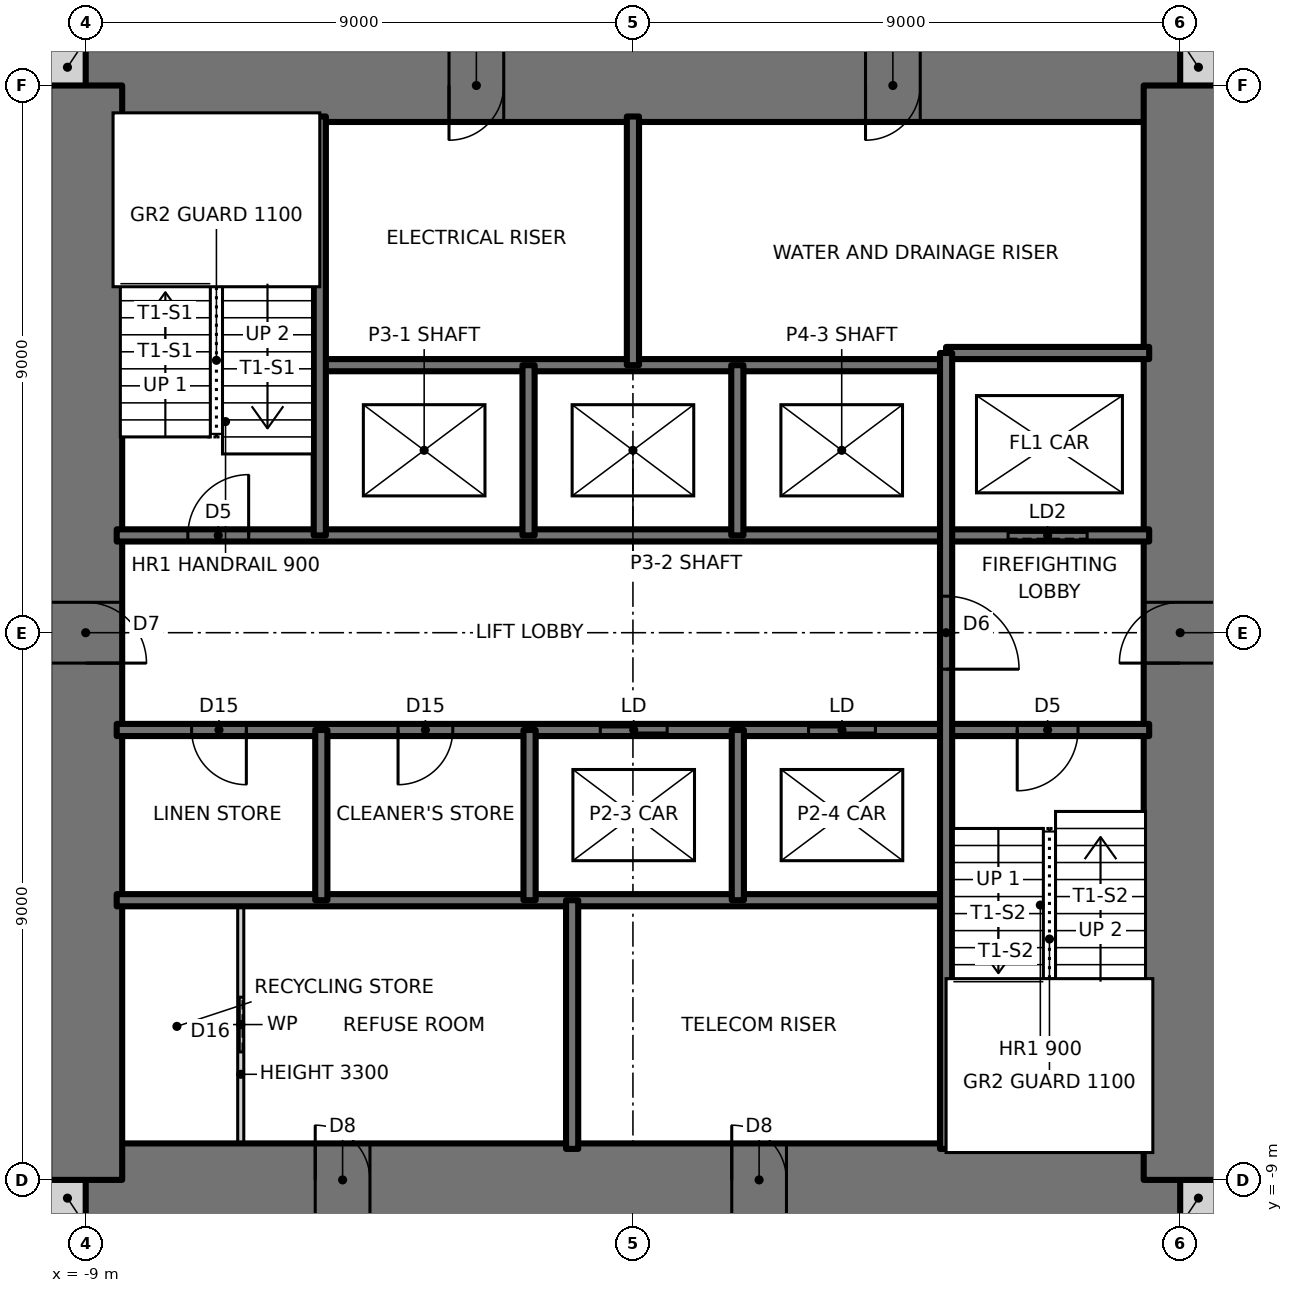
"""IFC4 building model, lengths in metres.
Left out: names, types, materials, properties, quantities, classifications, styles, units other than length and angle.
Written with IfcOpenShell. Run it as: python <this file> out.ifc"""

import sys

from ifc_helpers import new_model, si_unit, direction, frame, frame_2d, origin, place, context, subcontext, project, spatial, rectangle, extrude, element, fill, save


model = new_model("IFC4")
c1 = context("Model", 3, precision=1e-05, world=origin(), true_north=direction((0.0, 1.0)))
c2 = subcontext(c1, "Body", "Model", "MODEL_VIEW")
j1 = project(units=[si_unit("LENGTHUNIT", "METRE"), si_unit("PLANEANGLEUNIT", "RADIAN")], contexts=[c1])
p1 = place(None, origin())
s1 = spatial("IfcSite", under=j1, at=p1, CompositionType="ELEMENT")
p2 = place(p1, origin())
s2 = spatial("IfcBuilding", under=s1, at=p2, CompositionType="ELEMENT")
p3 = place(p2, frame((0.0, 0.0, 112.0)))
s3 = spatial("IfcBuildingStorey", under=s2, at=p3, CompositionType="ELEMENT", Elevation=112.0)
for number, where, z_axis, x_axis in (
    (1, (-9.6, -9.3, 0.0), (0.0, 0.0, 1.0), (1.0, 0.0, 0.0)),
    (2, (9.0, -9.3, 0.0), (0.0, 0.0, 1.0), (1.0, 0.0, 0.0)),
    (3, (9.0, 9.3, 0.0), (0.0, 0.0, 1.0), (1.0, 0.0, 0.0)),
    (4, (-9.6, 9.3, 0.0), (0.0, 0.0, 1.0), (1.0, 0.0, 0.0)),
):
    element("IfcWall", number, at=place(p3, frame(where, z_axis=z_axis, x_axis=x_axis)), inside=s3, PredefinedType="SOLIDWALL", context=c2, shape_type="SweptSolid", body=[
        extrude(rectangle(XDim=0.6, YDim=0.6, at=frame_2d((0.3, 0.0))), origin(), (0.0, 0.0, 1.0), 3.5),
    ])
p4 = place(p3, frame((-9.0, -9.0, 0.0), z_axis=(0.0, 0.0, 1.0), x_axis=(1.0, 0.0, 0.0)))
e5 = element("IfcWall", 5, at=p4, inside=s3, PredefinedType="SHEAR", context=c2, shape_type="SweptSolid", body=[
    extrude(rectangle(XDim=18.0, YDim=1.2, at=frame_2d((9.0, 0.0))), origin(), (0.0, 0.0, 1.0), 3.5),
])
p5 = place(p4, frame((3.775, 0.0, 0.0)))
e6 = element("IfcOpeningElement", 6, at=p5, cuts=e5, PredefinedType="OPENING", context=c2, shape_type="SweptSolid", body=[
    extrude(rectangle(XDim=0.9, YDim=2.1, at=frame_2d((0.45, 1.05))), frame((0.0, 0.61, 0.0), z_axis=(0.0, -1.0, 0.0), x_axis=(1.0, 0.0, 0.0)), (0.0, 0.0, 1.0), 1.22),
])
p6 = place(p4, frame((10.625, 0.0, 0.0)))
e7 = element("IfcOpeningElement", 7, at=p6, cuts=e5, PredefinedType="OPENING", context=c2, shape_type="SweptSolid", body=[
    extrude(rectangle(XDim=0.9, YDim=2.1, at=frame_2d((0.45, 1.05))), frame((0.0, 0.61, 0.0), z_axis=(0.0, -1.0, 0.0), x_axis=(1.0, 0.0, 0.0)), (0.0, 0.0, 1.0), 1.22),
])
p7 = place(p3, frame((9.0, 9.0, 0.0), z_axis=(0.0, 0.0, 1.0), x_axis=(-1.0, 0.0, 0.0)))
e8 = element("IfcWall", 8, at=p7, inside=s3, PredefinedType="SHEAR", context=c2, shape_type="SweptSolid", body=[
    extrude(rectangle(XDim=18.0, YDim=1.2, at=frame_2d((9.0, 0.0))), origin(), (0.0, 0.0, 1.0), 3.5),
])
p8 = place(p7, frame((11.125, 0.0, 0.0)))
e9 = element("IfcOpeningElement", 9, at=p8, cuts=e8, PredefinedType="OPENING", context=c2, shape_type="SweptSolid", body=[
    extrude(rectangle(XDim=0.9, YDim=2.1, at=frame_2d((0.45, 1.05))), frame((0.0, 0.61, 0.0), z_axis=(0.0, -1.0, 0.0), x_axis=(1.0, 0.0, 0.0)), (0.0, 0.0, 1.0), 1.22),
])
p9 = place(p7, frame((4.275, 0.0, 0.0)))
e10 = element("IfcOpeningElement", 10, at=p9, cuts=e8, PredefinedType="OPENING", context=c2, shape_type="SweptSolid", body=[
    extrude(rectangle(XDim=0.9, YDim=2.1, at=frame_2d((0.45, 1.05))), frame((0.0, 0.61, 0.0), z_axis=(0.0, -1.0, 0.0), x_axis=(1.0, 0.0, 0.0)), (0.0, 0.0, 1.0), 1.22),
])
p10 = place(p3, frame((9.0, -9.0, 0.0), z_axis=(0.0, 0.0, 1.0), x_axis=(0.0, 1.0, 0.0)))
e11 = element("IfcWall", 11, at=p10, inside=s3, PredefinedType="SHEAR", context=c2, shape_type="SweptSolid", body=[
    extrude(rectangle(XDim=18.0, YDim=1.2, at=frame_2d((9.0, 0.0))), origin(), (0.0, 0.0, 1.0), 3.5),
])
p11 = place(p10, frame((8.5, 0.0, 0.0)))
e12 = element("IfcOpeningElement", 12, at=p11, cuts=e11, PredefinedType="OPENING", context=c2, shape_type="SweptSolid", body=[
    extrude(rectangle(XDim=1.0, YDim=2.1, at=frame_2d((0.5, 1.05))), frame((0.0, 0.61, 0.0), z_axis=(0.0, -1.0, 0.0), x_axis=(1.0, 0.0, 0.0)), (0.0, 0.0, 1.0), 1.22),
])
p12 = place(p3, frame((-9.0, 9.0, 0.0), z_axis=(0.0, 0.0, 1.0), x_axis=(0.0, -1.0, 0.0)))
e13 = element("IfcWall", 13, at=p12, inside=s3, PredefinedType="SHEAR", context=c2, shape_type="SweptSolid", body=[
    extrude(rectangle(XDim=18.0, YDim=1.2, at=frame_2d((9.0, 0.0))), origin(), (0.0, 0.0, 1.0), 3.5),
])
p13 = place(p12, frame((8.5, 0.0, 0.0)))
e14 = element("IfcOpeningElement", 14, at=p13, cuts=e13, PredefinedType="OPENING", context=c2, shape_type="SweptSolid", body=[
    extrude(rectangle(XDim=1.0, YDim=2.1, at=frame_2d((0.5, 1.05))), frame((0.0, 0.61, 0.0), z_axis=(0.0, -1.0, 0.0), x_axis=(1.0, 0.0, 0.0)), (0.0, 0.0, 1.0), 1.22),
])
p14 = place(p3, frame((-8.49, -4.4, 0.0), z_axis=(0.0, 0.0, 1.0), x_axis=(1.0, 0.0, 0.0)))
e15 = element("IfcWall", 15, at=p14, inside=s3, PredefinedType="SOLIDWALL", context=c2, shape_type="SweptSolid", body=[
    extrude(rectangle(XDim=13.64, YDim=0.2, at=frame_2d((6.82, 0.0))), origin(), (0.0, 0.0, 1.0), 3.5),
])
p15 = place(p3, frame((-8.49, -1.6, 0.0), z_axis=(0.0, 0.0, 1.0), x_axis=(1.0, 0.0, 0.0)))
e16 = element("IfcWall", 16, at=p15, inside=s3, PredefinedType="SOLIDWALL", context=c2, shape_type="SweptSolid", body=[
    extrude(rectangle(XDim=16.98, YDim=0.2, at=frame_2d((8.49, 0.0))), origin(), (0.0, 0.0, 1.0), 3.5),
])
p16 = place(p15, frame((14.81, 0.0, 0.0)))
e17 = element("IfcOpeningElement", 17, at=p16, cuts=e16, PredefinedType="OPENING", context=c2, shape_type="SweptSolid", body=[
    extrude(rectangle(XDim=1.0, YDim=2.1, at=frame_2d((0.5, 1.05))), frame((0.0, 0.11, 0.0), z_axis=(0.0, -1.0, 0.0), x_axis=(1.0, 0.0, 0.0)), (0.0, 0.0, 1.0), 0.22),
])
p17 = place(p15, frame((1.232, 0.0, 0.0)))
e18 = element("IfcOpeningElement", 18, at=p17, cuts=e16, PredefinedType="OPENING", context=c2, shape_type="SweptSolid", body=[
    extrude(rectangle(XDim=0.9, YDim=2.1, at=frame_2d((0.45, 1.05))), frame((0.0, 0.11, 0.0), z_axis=(0.0, -1.0, 0.0), x_axis=(1.0, 0.0, 0.0)), (0.0, 0.0, 1.0), 0.22),
])
p18 = place(p15, frame((4.627, 0.0, 0.0)))
e19 = element("IfcOpeningElement", 19, at=p18, cuts=e16, PredefinedType="OPENING", context=c2, shape_type="SweptSolid", body=[
    extrude(rectangle(XDim=0.9, YDim=2.1, at=frame_2d((0.45, 1.05))), frame((0.0, 0.11, 0.0), z_axis=(0.0, -1.0, 0.0), x_axis=(1.0, 0.0, 0.0)), (0.0, 0.0, 1.0), 0.22),
])
p19 = place(p15, frame((7.953, 0.0, 0.0)))
e20 = element("IfcOpeningElement", 20, at=p19, cuts=e16, PredefinedType="OPENING", context=c2, shape_type="SweptSolid", body=[
    extrude(rectangle(XDim=1.1, YDim=2.1, at=frame_2d((0.55, 1.05))), frame((0.0, 0.11, 0.0), z_axis=(0.0, -1.0, 0.0), x_axis=(1.0, 0.0, 0.0)), (0.0, 0.0, 1.0), 0.22),
])
p20 = place(p15, frame((11.378, 0.0, 0.0)))
e21 = element("IfcOpeningElement", 21, at=p20, cuts=e16, PredefinedType="OPENING", context=c2, shape_type="SweptSolid", body=[
    extrude(rectangle(XDim=1.1, YDim=2.1, at=frame_2d((0.55, 1.05))), frame((0.0, 0.11, 0.0), z_axis=(0.0, -1.0, 0.0), x_axis=(1.0, 0.0, 0.0)), (0.0, 0.0, 1.0), 0.22),
])
p21 = place(p3, frame((-8.49, 1.6, 0.0), z_axis=(0.0, 0.0, 1.0), x_axis=(1.0, 0.0, 0.0)))
e22 = element("IfcWall", 22, at=p21, inside=s3, PredefinedType="SOLIDWALL", context=c2, shape_type="SweptSolid", body=[
    extrude(rectangle(XDim=16.98, YDim=0.2, at=frame_2d((8.49, 0.0))), origin(), (0.0, 0.0, 1.0), 3.5),
])
p22 = place(p21, frame((1.17, 0.0, 0.0)))
e23 = element("IfcOpeningElement", 23, at=p22, cuts=e22, PredefinedType="OPENING", context=c2, shape_type="SweptSolid", body=[
    extrude(rectangle(XDim=1.0, YDim=2.1, at=frame_2d((0.5, 1.05))), frame((0.0, 0.11, 0.0), z_axis=(0.0, -1.0, 0.0), x_axis=(1.0, 0.0, 0.0)), (0.0, 0.0, 1.0), 0.22),
])
p23 = place(p21, frame((14.66, 0.0, 0.0)))
e24 = element("IfcOpeningElement", 24, at=p23, cuts=e22, PredefinedType="OPENING", context=c2, shape_type="SweptSolid", body=[
    extrude(rectangle(XDim=1.3, YDim=2.1, at=frame_2d((0.65, 1.05))), frame((0.0, 0.11, 0.0), z_axis=(0.0, -1.0, 0.0), x_axis=(1.0, 0.0, 0.0)), (0.0, 0.0, 1.0), 0.22),
])
p24 = place(p3, frame((-5.15, 4.4, 0.0), z_axis=(0.0, 0.0, 1.0), x_axis=(1.0, 0.0, 0.0)))
e25 = element("IfcWall", 25, at=p24, inside=s3, PredefinedType="SOLIDWALL", context=c2, shape_type="SweptSolid", body=[
    extrude(rectangle(XDim=10.3, YDim=0.2, at=frame_2d((5.15, 0.0))), origin(), (0.0, 0.0, 1.0), 3.5),
])
p25 = place(p3, frame((5.15, 4.6, 0.0), z_axis=(0.0, 0.0, 1.0), x_axis=(1.0, 0.0, 0.0)))
e26 = element("IfcWall", 26, at=p25, inside=s3, PredefinedType="SOLIDWALL", context=c2, shape_type="SweptSolid", body=[
    extrude(rectangle(XDim=3.34, YDim=0.2, at=frame_2d((1.67, 0.0))), origin(), (0.0, 0.0, 1.0), 3.5),
])
p26 = place(p3, frame((5.15, -8.49, 0.0), z_axis=(0.0, 0.0, 1.0), x_axis=(0.0, 1.0, 0.0)))
e27 = element("IfcWall", 27, at=p26, inside=s3, PredefinedType="SOLIDWALL", context=c2, shape_type="SweptSolid", body=[
    extrude(rectangle(XDim=13.09, YDim=0.2, at=frame_2d((6.545, 0.0))), origin(), (0.0, 0.0, 1.0), 3.5),
])
p27 = place(p26, frame((7.89, 0.0, 0.0)))
e28 = element("IfcOpeningElement", 28, at=p27, cuts=e27, PredefinedType="OPENING", context=c2, shape_type="SweptSolid", body=[
    extrude(rectangle(XDim=1.2, YDim=2.1, at=frame_2d((0.6, 1.05))), frame((0.0, 0.11, 0.0), z_axis=(0.0, -1.0, 0.0), x_axis=(1.0, 0.0, 0.0)), (0.0, 0.0, 1.0), 0.22),
])
for number, where, z_axis, x_axis in (
    (29, (1.725, -4.4, 0.0), (0.0, 0.0, 1.0), (0.0, 1.0, 0.0)),
    (30, (1.717, 1.6, 0.0), (0.0, 0.0, 1.0), (0.0, 1.0, 0.0)),
):
    element("IfcWall", number, at=place(p3, frame(where, z_axis=z_axis, x_axis=x_axis)), inside=s3, PredefinedType="SOLIDWALL", context=c2, shape_type="SweptSolid", body=[
        extrude(rectangle(XDim=2.8, YDim=0.2, at=frame_2d((1.4, 0.0))), origin(), (0.0, 0.0, 1.0), 3.5),
    ])
for number, where, z_axis, x_axis in (
    (31, (0.0, 4.4, 0.0), (0.0, 0.0, 1.0), (0.0, 1.0, 0.0)),
    (32, (-1.0, -8.49, 0.0), (0.0, 0.0, 1.0), (0.0, 1.0, 0.0)),
):
    element("IfcWall", number, at=place(p3, frame(where, z_axis=z_axis, x_axis=x_axis)), inside=s3, PredefinedType="SOLIDWALL", context=c2, shape_type="SweptSolid", body=[
        extrude(rectangle(XDim=4.09, YDim=0.2, at=frame_2d((2.045, 0.0))), origin(), (0.0, 0.0, 1.0), 3.5),
    ])
for number, where, z_axis, x_axis in (
    (33, (-1.7, -4.4, 0.0), (0.0, 0.0, 1.0), (0.0, 1.0, 0.0)),
    (34, (-1.717, 1.6, 0.0), (0.0, 0.0, 1.0), (0.0, 1.0, 0.0)),
    (35, (-5.125, -4.4, 0.0), (0.0, 0.0, 1.0), (0.0, 1.0, 0.0)),
):
    element("IfcWall", number, at=place(p3, frame(where, z_axis=z_axis, x_axis=x_axis)), inside=s3, PredefinedType="SOLIDWALL", context=c2, shape_type="SweptSolid", body=[
        extrude(rectangle(XDim=2.8, YDim=0.2, at=frame_2d((1.4, 0.0))), origin(), (0.0, 0.0, 1.0), 3.5),
    ])
p28 = place(p3, frame((-5.15, 1.6, 0.0), z_axis=(0.0, 0.0, 1.0), x_axis=(0.0, 1.0, 0.0)))
e36 = element("IfcWall", 36, at=p28, inside=s3, PredefinedType="SOLIDWALL", context=c2, shape_type="SweptSolid", body=[
    extrude(rectangle(XDim=6.89, YDim=0.2, at=frame_2d((3.445, 0.0))), origin(), (0.0, 0.0, 1.0), 3.5),
])
p29 = place(p3, frame((-6.45, -8.49, 0.0), z_axis=(0.0, 0.0, 1.0), x_axis=(0.0, 1.0, 0.0)))
e37 = element("IfcWall", 37, at=p29, inside=s3, PredefinedType="PARTITIONING", context=c2, shape_type="SweptSolid", body=[
    extrude(rectangle(XDim=4.09, YDim=0.1, at=frame_2d((2.045, 0.0))), origin(), (0.0, 0.0, 1.0), 3.3),
])
p30 = place(p29, frame((1.595, 0.0, 0.0)))
e38 = element("IfcOpeningElement", 38, at=p30, cuts=e37, PredefinedType="OPENING", context=c2, shape_type="SweptSolid", body=[
    extrude(rectangle(XDim=0.9, YDim=2.1, at=frame_2d((0.45, 1.05))), frame((0.0, 0.06, 0.0), z_axis=(0.0, -1.0, 0.0), x_axis=(1.0, 0.0, 0.0)), (0.0, 0.0, 1.0), 0.12),
])
p31 = place(p22, origin())
e39 = element("IfcDoor", 39, at=p31, inside=s3, OperationType="SINGLE_SWING_RIGHT", PredefinedType="DOOR", context=c2, shape_type="SweptSolid", body=[
    extrude(rectangle(XDim=1.0, YDim=2.1, at=frame_2d((0.5, 1.05))), frame((0.0, 0.025, 0.0), z_axis=(0.0, -1.0, 0.0), x_axis=(1.0, 0.0, 0.0)), (0.0, 0.0, 1.0), 0.05),
])
fill(e23, e39)
p32 = place(p16, frame((1.0, 0.0, 0.0), z_axis=(0.0, 0.0, 1.0), x_axis=(-1.0, 0.0, 0.0)))
e40 = element("IfcDoor", 40, at=p32, inside=s3, OperationType="SINGLE_SWING_RIGHT", PredefinedType="DOOR", context=c2, shape_type="SweptSolid", body=[
    extrude(rectangle(XDim=1.0, YDim=2.1, at=frame_2d((0.5, 1.05))), frame((0.0, 0.025, 0.0), z_axis=(0.0, -1.0, 0.0), x_axis=(1.0, 0.0, 0.0)), (0.0, 0.0, 1.0), 0.05),
])
fill(e17, e40)
p33 = place(p27, frame((1.2, 0.0, 0.0), z_axis=(0.0, 0.0, 1.0), x_axis=(-1.0, 0.0, 0.0)))
e41 = element("IfcDoor", 41, at=p33, inside=s3, OperationType="SINGLE_SWING_RIGHT", PredefinedType="DOOR", context=c2, shape_type="SweptSolid", body=[
    extrude(rectangle(XDim=1.2, YDim=2.1, at=frame_2d((0.6, 1.05))), frame((0.0, 0.025, 0.0), z_axis=(0.0, -1.0, 0.0), x_axis=(1.0, 0.0, 0.0)), (0.0, 0.0, 1.0), 0.05),
])
fill(e28, e41)
p34 = place(p17, frame((0.9, 0.0, 0.0), z_axis=(0.0, 0.0, 1.0), x_axis=(-1.0, 0.0, 0.0)))
e42 = element("IfcDoor", 42, at=p34, inside=s3, OperationType="SINGLE_SWING_LEFT", PredefinedType="DOOR", context=c2, shape_type="SweptSolid", body=[
    extrude(rectangle(XDim=0.9, YDim=2.1, at=frame_2d((0.45, 1.05))), frame((0.0, 0.025, 0.0), z_axis=(0.0, -1.0, 0.0), x_axis=(1.0, 0.0, 0.0)), (0.0, 0.0, 1.0), 0.05),
])
fill(e18, e42)
p35 = place(p18, frame((0.9, 0.0, 0.0), z_axis=(0.0, 0.0, 1.0), x_axis=(-1.0, 0.0, 0.0)))
e43 = element("IfcDoor", 43, at=p35, inside=s3, OperationType="SINGLE_SWING_RIGHT", PredefinedType="DOOR", context=c2, shape_type="SweptSolid", body=[
    extrude(rectangle(XDim=0.9, YDim=2.1, at=frame_2d((0.45, 1.05))), frame((0.0, 0.025, 0.0), z_axis=(0.0, -1.0, 0.0), x_axis=(1.0, 0.0, 0.0)), (0.0, 0.0, 1.0), 0.05),
])
fill(e19, e43)
p36 = place(p30, origin())
e44 = element("IfcDoor", 44, at=p36, inside=s3, OperationType="SLIDING_TO_LEFT", PredefinedType="DOOR", context=c2, shape_type="SweptSolid", body=[
    extrude(rectangle(XDim=0.9, YDim=2.1, at=frame_2d((0.45, 1.05))), frame((0.0, 0.025, 0.0), z_axis=(0.0, -1.0, 0.0), x_axis=(1.0, 0.0, 0.0)), (0.0, 0.0, 1.0), 0.05),
])
fill(e38, e44)
p37 = place(p13, origin())
e45 = element("IfcDoor", 45, at=p37, inside=s3, OperationType="SINGLE_SWING_RIGHT", PredefinedType="DOOR", context=c2, shape_type="SweptSolid", body=[
    extrude(rectangle(XDim=1.0, YDim=2.1, at=frame_2d((0.5, 1.05))), frame((0.0, 0.025, 0.0), z_axis=(0.0, -1.0, 0.0), x_axis=(1.0, 0.0, 0.0)), (0.0, 0.0, 1.0), 0.05),
])
fill(e14, e45)
p38 = place(p11, origin())
e46 = element("IfcDoor", 46, at=p38, inside=s3, OperationType="SINGLE_SWING_LEFT", PredefinedType="DOOR", context=c2, shape_type="SweptSolid", body=[
    extrude(rectangle(XDim=1.0, YDim=2.1, at=frame_2d((0.5, 1.05))), frame((0.0, 0.025, 0.0), z_axis=(0.0, -1.0, 0.0), x_axis=(1.0, 0.0, 0.0)), (0.0, 0.0, 1.0), 0.05),
])
fill(e12, e46)
p39 = place(p8, origin())
e47 = element("IfcDoor", 47, at=p39, inside=s3, OperationType="SINGLE_SWING_RIGHT", PredefinedType="DOOR", context=c2, shape_type="SweptSolid", body=[
    extrude(rectangle(XDim=0.9, YDim=2.1, at=frame_2d((0.45, 1.05))), frame((0.0, 0.025, 0.0), z_axis=(0.0, -1.0, 0.0), x_axis=(1.0, 0.0, 0.0)), (0.0, 0.0, 1.0), 0.05),
])
fill(e9, e47)
p40 = place(p9, origin())
e48 = element("IfcDoor", 48, at=p40, inside=s3, OperationType="SINGLE_SWING_RIGHT", PredefinedType="DOOR", context=c2, shape_type="SweptSolid", body=[
    extrude(rectangle(XDim=0.9, YDim=2.1, at=frame_2d((0.45, 1.05))), frame((0.0, 0.025, 0.0), z_axis=(0.0, -1.0, 0.0), x_axis=(1.0, 0.0, 0.0)), (0.0, 0.0, 1.0), 0.05),
])
fill(e10, e48)
p41 = place(p5, origin())
e49 = element("IfcDoor", 49, at=p41, inside=s3, OperationType="SINGLE_SWING_LEFT", PredefinedType="DOOR", context=c2, shape_type="SweptSolid", body=[
    extrude(rectangle(XDim=0.9, YDim=2.1, at=frame_2d((0.45, 1.05))), frame((0.0, 0.025, 0.0), z_axis=(0.0, -1.0, 0.0), x_axis=(1.0, 0.0, 0.0)), (0.0, 0.0, 1.0), 0.05),
])
fill(e6, e49)
p42 = place(p6, origin())
e50 = element("IfcDoor", 50, at=p42, inside=s3, OperationType="SINGLE_SWING_LEFT", PredefinedType="DOOR", context=c2, shape_type="SweptSolid", body=[
    extrude(rectangle(XDim=0.9, YDim=2.1, at=frame_2d((0.45, 1.05))), frame((0.0, 0.025, 0.0), z_axis=(0.0, -1.0, 0.0), x_axis=(1.0, 0.0, 0.0)), (0.0, 0.0, 1.0), 0.05),
])
fill(e7, e50)
p43 = place(p19, origin())
e51 = element("IfcDoor", 51, at=p43, inside=s3, OperationType="DOUBLE_DOOR_SLIDING", PredefinedType="DOOR", context=c2, shape_type="SweptSolid", body=[
    extrude(rectangle(XDim=1.1, YDim=2.1, at=frame_2d((0.55, 1.05))), frame((0.0, 0.025, 0.0), z_axis=(0.0, -1.0, 0.0), x_axis=(1.0, 0.0, 0.0)), (0.0, 0.0, 1.0), 0.05),
])
fill(e20, e51)
p44 = place(p20, origin())
e52 = element("IfcDoor", 52, at=p44, inside=s3, OperationType="DOUBLE_DOOR_SLIDING", PredefinedType="DOOR", context=c2, shape_type="SweptSolid", body=[
    extrude(rectangle(XDim=1.1, YDim=2.1, at=frame_2d((0.55, 1.05))), frame((0.0, 0.025, 0.0), z_axis=(0.0, -1.0, 0.0), x_axis=(1.0, 0.0, 0.0)), (0.0, 0.0, 1.0), 0.05),
])
fill(e21, e52)
p45 = place(p23, origin())
e53 = element("IfcDoor", 53, at=p45, inside=s3, OperationType="SLIDING_TO_LEFT", PredefinedType="DOOR", context=c2, shape_type="SweptSolid", body=[
    extrude(rectangle(XDim=1.3, YDim=2.1, at=frame_2d((0.65, 1.05))), frame((0.0, 0.025, 0.0), z_axis=(0.0, -1.0, 0.0), x_axis=(1.0, 0.0, 0.0)), (0.0, 0.0, 1.0), 0.05),
])
fill(e24, e53)
save(model, sys.argv[1])
